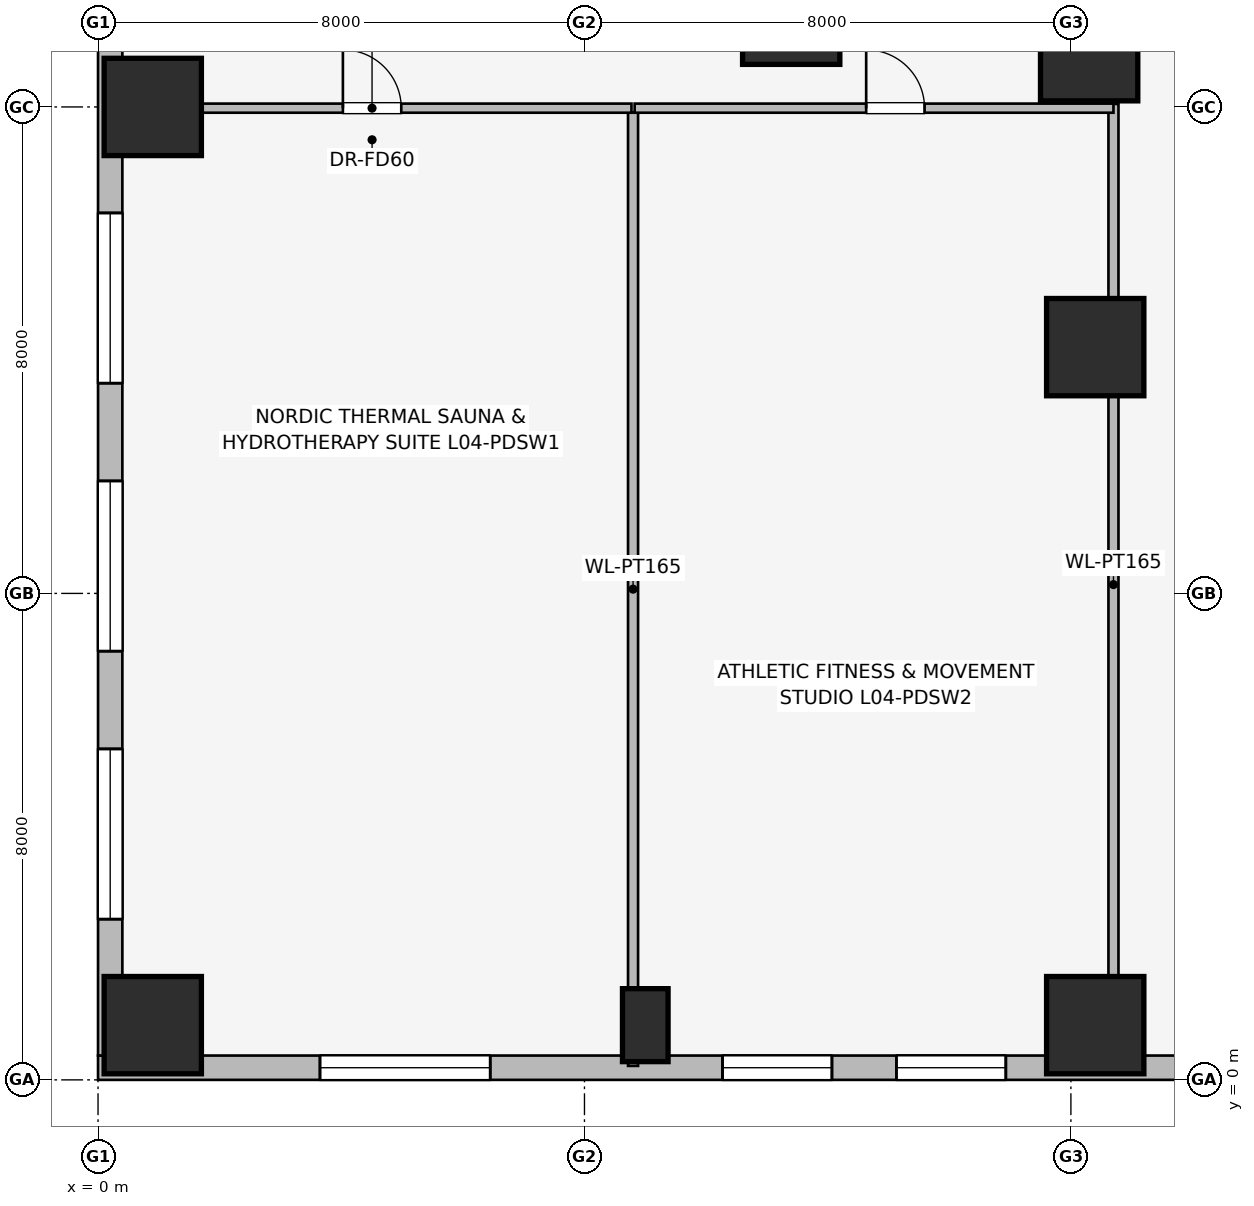
"""IFC4 building model, lengths in metres.
Left out: names, types, materials, properties, quantities, classifications, styles, units other than length and angle.
Written with IfcOpenShell. Run it as: python <this file> out.ifc"""

import sys

from ifc_helpers import new_model, si_unit, direction, frame, frame_2d, origin, origin_2d, place, context, subcontext, project, spatial, rectangle, extrude, element, fill, save


model = new_model("IFC4")
c1 = context("Model", 3, precision=1e-05, world=origin(), true_north=direction((0.0, 1.0)))
c2 = subcontext(c1, "Body", "Model", "MODEL_VIEW")
j1 = project(units=[si_unit("LENGTHUNIT", "METRE"), si_unit("PLANEANGLEUNIT", "RADIAN")], contexts=[c1])
p1 = place(None, origin())
s1 = spatial("IfcSite", under=j1, at=p1, CompositionType="ELEMENT")
p2 = place(p1, origin())
s2 = spatial("IfcBuilding", under=s1, at=p2, CompositionType="ELEMENT")
p3 = place(p2, frame((0.0, 0.0, 16.0)))
s3 = spatial("IfcBuildingStorey", under=s2, at=p3, CompositionType="ELEMENT", Elevation=16.0)
for number, where, z_axis, x_axis in (
    (1, (16.3, 16.9, 0.0), (0.0, 0.0, 1.0), (1.0, 0.0, 0.0)),
    (2, (0.9, 0.9, 0.0), (0.0, 0.0, 1.0), (1.0, 0.0, 0.0)),
    (3, (16.4, 0.9, 0.0), (0.0, 0.0, 1.0), (1.0, 0.0, 0.0)),
    (4, (0.9, 16.0, 0.0), (0.0, 0.0, 1.0), (1.0, 0.0, 0.0)),
    (5, (11.4, 17.5, 0.0), (0.0, 0.0, 1.0), (1.0, 0.0, 0.0)),
    (6, (16.4, 12.05, 0.0), (0.0, 0.0, 1.0), (1.0, 0.0, 0.0)),
):
    element("IfcColumn", number, at=place(p3, frame(where, z_axis=z_axis, x_axis=x_axis)), inside=s3, PredefinedType="COLUMN", context=c2, shape_type="SweptSolid", body=[
        extrude(rectangle(XDim=1.6, YDim=1.6, at=origin_2d()), origin(), (0.0, 0.0, 1.0), 5.0),
    ])
p4 = place(p3, frame((9.0, 0.9, 0.0), z_axis=(0.0, 0.0, 1.0), x_axis=(1.0, 0.0, 0.0)))
e7 = element("IfcColumn", 7, at=p4, inside=s3, PredefinedType="PILASTER", context=c2, shape_type="SweptSolid", body=[
    extrude(rectangle(XDim=0.75, YDim=1.2, at=origin_2d()), origin(), (0.0, 0.0, 1.0), 5.0),
])
p5 = place(p3, frame((24.0, 0.2, 0.0), z_axis=(0.0, 0.0, 1.0), x_axis=(-1.0, 0.0, 0.0)))
e8 = element("IfcWall", 8, at=p5, inside=s3, PredefinedType="STANDARD", context=c2, shape_type="SweptSolid", body=[
    extrude(rectangle(XDim=24.0, YDim=0.4, at=frame_2d((12.0, 0.0))), origin(), (0.0, 0.0, 1.0), 4.58),
])
p6 = place(p5, frame((2.205, 0.0, 0.75)))
e9 = element("IfcOpeningElement", 9, at=p6, cuts=e8, PredefinedType="OPENING", context=c2, shape_type="SweptSolid", body=[
    extrude(rectangle(XDim=2.8, YDim=1.8, at=frame_2d((1.4, 0.9))), frame((0.0, 0.21, 0.0), z_axis=(0.0, -1.0, 0.0), x_axis=(1.0, 0.0, 0.0)), (0.0, 0.0, 1.0), 0.42),
])
p7 = place(p5, frame((9.07, 0.0, 0.75)))
e10 = element("IfcOpeningElement", 10, at=p7, cuts=e8, PredefinedType="OPENING", context=c2, shape_type="SweptSolid", body=[
    extrude(rectangle(XDim=1.8, YDim=1.5, at=frame_2d((0.9, 0.75))), frame((0.0, 0.21, 0.0), z_axis=(0.0, -1.0, 0.0), x_axis=(1.0, 0.0, 0.0)), (0.0, 0.0, 1.0), 0.42),
])
p8 = place(p5, frame((11.93, 0.0, 0.75)))
e11 = element("IfcOpeningElement", 11, at=p8, cuts=e8, PredefinedType="OPENING", context=c2, shape_type="SweptSolid", body=[
    extrude(rectangle(XDim=1.8, YDim=1.5, at=frame_2d((0.9, 0.75))), frame((0.0, 0.21, 0.0), z_axis=(0.0, -1.0, 0.0), x_axis=(1.0, 0.0, 0.0)), (0.0, 0.0, 1.0), 0.42),
])
p9 = place(p5, frame((17.55, 0.0, 0.75)))
e12 = element("IfcOpeningElement", 12, at=p9, cuts=e8, PredefinedType="OPENING", context=c2, shape_type="SweptSolid", body=[
    extrude(rectangle(XDim=2.8, YDim=1.8, at=frame_2d((1.4, 0.9))), frame((0.0, 0.21, 0.0), z_axis=(0.0, -1.0, 0.0), x_axis=(1.0, 0.0, 0.0)), (0.0, 0.0, 1.0), 0.42),
])
p10 = place(p3, frame((0.2, 0.4, 0.0), z_axis=(0.0, 0.0, 1.0), x_axis=(0.0, 1.0, 0.0)))
e13 = element("IfcWall", 13, at=p10, inside=s3, PredefinedType="STANDARD", context=c2, shape_type="SweptSolid", body=[
    extrude(rectangle(XDim=16.6, YDim=0.4, at=frame_2d((8.3, 0.0))), origin(), (0.0, 0.0, 1.0), 4.58),
])
p11 = place(p10, frame((2.243, 0.0, 0.75)))
e14 = element("IfcOpeningElement", 14, at=p11, cuts=e13, PredefinedType="OPENING", context=c2, shape_type="SweptSolid", body=[
    extrude(rectangle(XDim=2.8, YDim=1.8, at=frame_2d((1.4, 0.9))), frame((0.0, 0.21, 0.0), z_axis=(0.0, -1.0, 0.0), x_axis=(1.0, 0.0, 0.0)), (0.0, 0.0, 1.0), 0.42),
])
p12 = place(p10, frame((6.65, 0.0, 0.75)))
e15 = element("IfcOpeningElement", 15, at=p12, cuts=e13, PredefinedType="OPENING", context=c2, shape_type="SweptSolid", body=[
    extrude(rectangle(XDim=2.8, YDim=1.8, at=frame_2d((1.4, 0.9))), frame((0.0, 0.21, 0.0), z_axis=(0.0, -1.0, 0.0), x_axis=(1.0, 0.0, 0.0)), (0.0, 0.0, 1.0), 0.42),
])
p13 = place(p10, frame((11.057, 0.0, 0.75)))
e16 = element("IfcOpeningElement", 16, at=p13, cuts=e13, PredefinedType="OPENING", context=c2, shape_type="SweptSolid", body=[
    extrude(rectangle(XDim=2.8, YDim=1.8, at=frame_2d((1.4, 0.9))), frame((0.0, 0.21, 0.0), z_axis=(0.0, -1.0, 0.0), x_axis=(1.0, 0.0, 0.0)), (0.0, 0.0, 1.0), 0.42),
])
p14 = place(p3, frame((16.7, 0.24, 0.0), z_axis=(0.0, 0.0, 1.0), x_axis=(0.0, 1.0, 0.0)))
e17 = element("IfcWall", 17, at=p14, inside=s3, PredefinedType="PARTITIONING", context=c2, shape_type="SweptSolid", body=[
    extrude(rectangle(XDim=15.81, YDim=0.165, at=frame_2d((7.905, 0.0))), origin(), (0.0, 0.0, 1.0), 3.653),
])
p15 = place(p3, frame((8.799, 0.23, 0.0), z_axis=(0.0, 0.0, 1.0), x_axis=(0.0, 1.0, 0.0)))
e18 = element("IfcWall", 18, at=p15, inside=s3, PredefinedType="PARTITIONING", context=c2, shape_type="SweptSolid", body=[
    extrude(rectangle(XDim=15.68, YDim=0.165, at=frame_2d((7.84, 0.0))), origin(), (0.0, 0.0, 1.0), 4.58),
])
p16 = place(p3, frame((0.24, 15.98, 0.0), z_axis=(0.0, 0.0, 1.0), x_axis=(1.0, 0.0, 0.0)))
e19 = element("IfcWall", 19, at=p16, inside=s3, PredefinedType="PARTITIONING", context=c2, shape_type="SweptSolid", body=[
    extrude(rectangle(XDim=8.533, YDim=0.15, at=frame_2d((4.267, 0.0))), origin(), (0.0, 0.0, 1.0), 3.632),
])
p17 = place(p16, frame((3.787, 0.0, 0.0)))
e20 = element("IfcOpeningElement", 20, at=p17, cuts=e19, PredefinedType="OPENING", context=c2, shape_type="SweptSolid", body=[
    extrude(rectangle(XDim=0.96, YDim=2.0, at=frame_2d((0.48, 1.0))), frame((0.0, 0.085, 0.0), z_axis=(0.0, -1.0, 0.0), x_axis=(1.0, 0.0, 0.0)), (0.0, 0.0, 1.0), 0.17),
])
p18 = place(p3, frame((8.825, 15.98, 0.0), z_axis=(0.0, 0.0, 1.0), x_axis=(1.0, 0.0, 0.0)))
e21 = element("IfcWall", 21, at=p18, inside=s3, PredefinedType="PARTITIONING", context=c2, shape_type="SweptSolid", body=[
    extrude(rectangle(XDim=7.875, YDim=0.15, at=frame_2d((3.938, 0.0))), origin(), (0.0, 0.0, 1.0), 4.58),
])
p19 = place(p18, frame((3.808, 0.0, 0.0)))
e22 = element("IfcOpeningElement", 22, at=p19, cuts=e21, PredefinedType="OPENING", context=c2, shape_type="SweptSolid", body=[
    extrude(rectangle(XDim=0.96, YDim=2.0, at=frame_2d((0.48, 1.0))), frame((0.0, 0.085, 0.0), z_axis=(0.0, -1.0, 0.0), x_axis=(1.0, 0.0, 0.0)), (0.0, 0.0, 1.0), 0.17),
])
p20 = place(p7, origin())
e23 = element("IfcWindow", 23, at=p20, inside=s3, PartitioningType="SINGLE_PANEL", PredefinedType="WINDOW", context=c2, shape_type="SweptSolid", body=[
    extrude(rectangle(XDim=1.8, YDim=1.5, at=frame_2d((0.9, 0.75))), frame((0.0, 0.03, 0.0), z_axis=(0.0, -1.0, 0.0), x_axis=(1.0, 0.0, 0.0)), (0.0, 0.0, 1.0), 0.06),
])
fill(e10, e23)
p21 = place(p8, origin())
e24 = element("IfcWindow", 24, at=p21, inside=s3, PartitioningType="SINGLE_PANEL", PredefinedType="WINDOW", context=c2, shape_type="SweptSolid", body=[
    extrude(rectangle(XDim=1.8, YDim=1.5, at=frame_2d((0.9, 0.75))), frame((0.0, 0.03, 0.0), z_axis=(0.0, -1.0, 0.0), x_axis=(1.0, 0.0, 0.0)), (0.0, 0.0, 1.0), 0.06),
])
fill(e11, e24)
p22 = place(p9, origin())
e25 = element("IfcWindow", 25, at=p22, inside=s3, PartitioningType="SINGLE_PANEL", PredefinedType="WINDOW", context=c2, shape_type="SweptSolid", body=[
    extrude(rectangle(XDim=2.8, YDim=1.8, at=frame_2d((1.4, 0.9))), frame((0.0, 0.03, 0.0), z_axis=(0.0, -1.0, 0.0), x_axis=(1.0, 0.0, 0.0)), (0.0, 0.0, 1.0), 0.06),
])
fill(e12, e25)
p23 = place(p11, origin())
e26 = element("IfcWindow", 26, at=p23, inside=s3, PartitioningType="SINGLE_PANEL", PredefinedType="WINDOW", context=c2, shape_type="SweptSolid", body=[
    extrude(rectangle(XDim=2.8, YDim=1.8, at=frame_2d((1.4, 0.9))), frame((0.0, 0.03, 0.0), z_axis=(0.0, -1.0, 0.0), x_axis=(1.0, 0.0, 0.0)), (0.0, 0.0, 1.0), 0.06),
])
fill(e14, e26)
p24 = place(p12, origin())
e27 = element("IfcWindow", 27, at=p24, inside=s3, PartitioningType="SINGLE_PANEL", PredefinedType="WINDOW", context=c2, shape_type="SweptSolid", body=[
    extrude(rectangle(XDim=2.8, YDim=1.8, at=frame_2d((1.4, 0.9))), frame((0.0, 0.03, 0.0), z_axis=(0.0, -1.0, 0.0), x_axis=(1.0, 0.0, 0.0)), (0.0, 0.0, 1.0), 0.06),
])
fill(e15, e27)
p25 = place(p13, origin())
e28 = element("IfcWindow", 28, at=p25, inside=s3, PartitioningType="SINGLE_PANEL", PredefinedType="WINDOW", context=c2, shape_type="SweptSolid", body=[
    extrude(rectangle(XDim=2.8, YDim=1.8, at=frame_2d((1.4, 0.9))), frame((0.0, 0.03, 0.0), z_axis=(0.0, -1.0, 0.0), x_axis=(1.0, 0.0, 0.0)), (0.0, 0.0, 1.0), 0.06),
])
fill(e16, e28)
p26 = place(p17, origin())
e29 = element("IfcDoor", 29, at=p26, inside=s3, OperationType="SINGLE_SWING_LEFT", PredefinedType="DOOR", context=c2, shape_type="SweptSolid", body=[
    extrude(rectangle(XDim=0.96, YDim=2.0, at=frame_2d((0.48, 1.0))), frame((0.0, 0.025, 0.0), z_axis=(0.0, -1.0, 0.0), x_axis=(1.0, 0.0, 0.0)), (0.0, 0.0, 1.0), 0.05),
])
fill(e20, e29)
p27 = place(p19, origin())
e30 = element("IfcDoor", 30, at=p27, inside=s3, OperationType="SINGLE_SWING_LEFT", PredefinedType="DOOR", context=c2, shape_type="SweptSolid", body=[
    extrude(rectangle(XDim=0.96, YDim=2.0, at=frame_2d((0.48, 1.0))), frame((0.0, 0.025, 0.0), z_axis=(0.0, -1.0, 0.0), x_axis=(1.0, 0.0, 0.0)), (0.0, 0.0, 1.0), 0.05),
])
fill(e22, e30)
save(model, sys.argv[1])
